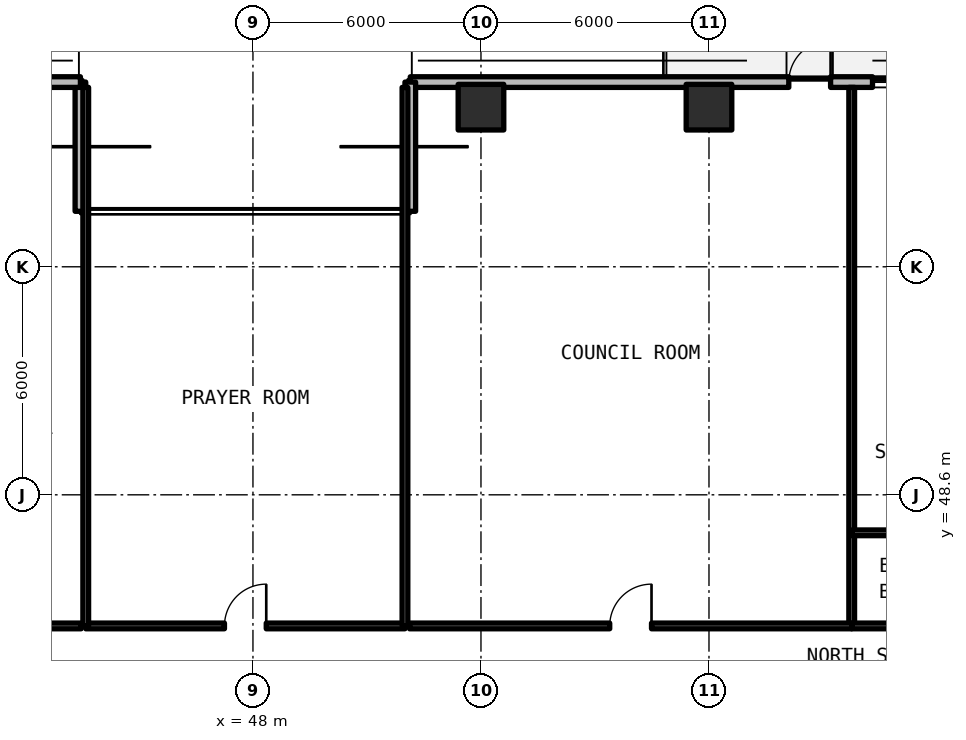
"""IFC4 building model, lengths in metres.
Left out: names, types, materials, properties, quantities, classifications, styles, units other than length and angle.
Written with IfcOpenShell. Run it as: python <this file> out.ifc"""

import sys

from ifc_helpers import new_model, si_unit, direction, frame, frame_2d, origin, origin_2d, place, context, subcontext, project, spatial, rectangle, extrude, element, fill, save


model = new_model("IFC4")
c1 = context("Model", 3, precision=1e-05, world=origin(), true_north=direction((0.0, 1.0)))
c2 = subcontext(c1, "Body", "Model", "MODEL_VIEW")
j1 = project(units=[si_unit("LENGTHUNIT", "METRE"), si_unit("PLANEANGLEUNIT", "RADIAN")], contexts=[c1])
p1 = place(None, origin())
s1 = spatial("IfcSite", under=j1, at=p1, CompositionType="ELEMENT")
p2 = place(p1, origin())
s2 = spatial("IfcBuilding", under=s1, at=p2, CompositionType="ELEMENT")
p3 = place(p2, frame((0.0, 0.0, 42.24)))
s3 = spatial("IfcBuildingStorey", under=s2, at=p3, CompositionType="ELEMENT", Elevation=42.24)
for number, where, z_axis, x_axis in (
    (1, (54.0, 58.8, 0.0), (0.0, 0.0, 1.0), (1.0, 0.0, 0.0)),
    (2, (60.0, 58.8, 0.0), (0.0, 0.0, 1.0), (1.0, 0.0, 0.0)),
):
    element("IfcColumn", number, at=place(p3, frame(where, z_axis=z_axis, x_axis=x_axis)), inside=s3, PredefinedType="COLUMN", context=c2, shape_type="SweptSolid", body=[
        extrude(rectangle(XDim=1.2, YDim=1.2, at=origin_2d()), origin(), (0.0, 0.0, 1.0), 3.3),
    ])
p4 = place(p3, frame((96.542, 59.46, 0.0), z_axis=(0.0, 0.0, 1.0), x_axis=(-1.0, 0.0, 0.0)))
e3 = element("IfcWall", 3, at=p4, inside=s3, PredefinedType="SOLIDWALL", context=c2, shape_type="SweptSolid", body=[
    extrude(rectangle(XDim=44.402, YDim=0.28, at=frame_2d((22.201, 0.0))), origin(), (0.0, 0.0, 1.0), 3.08),
])
p5 = place(p4, frame((33.342, 0.0, 0.0)))
e4 = element("IfcOpeningElement", 4, at=p5, cuts=e3, PredefinedType="OPENING", context=c2, shape_type="SweptSolid", body=[
    extrude(rectangle(XDim=1.1, YDim=2.15, at=frame_2d((0.55, 1.075))), frame((0.0, 0.15, 0.0), z_axis=(0.0, -1.0, 0.0), x_axis=(1.0, 0.0, 0.0)), (0.0, 0.0, 1.0), 0.3),
])
p6 = place(p4, frame((20.992, 0.0, 0.0)))
e5 = element("IfcOpeningElement", 5, at=p6, cuts=e3, PredefinedType="OPENING", context=c2, shape_type="SweptSolid", body=[
    extrude(rectangle(XDim=1.1, YDim=2.15, at=frame_2d((0.55, 1.075))), frame((0.0, 0.15, 0.0), z_axis=(0.0, -1.0, 0.0), x_axis=(1.0, 0.0, 0.0)), (0.0, 0.0, 1.0), 0.3),
])
p7 = place(p4, frame((9.392, 0.0, 0.0)))
e6 = element("IfcOpeningElement", 6, at=p7, cuts=e3, PredefinedType="OPENING", context=c2, shape_type="SweptSolid", body=[
    extrude(rectangle(XDim=1.1, YDim=2.15, at=frame_2d((0.55, 1.075))), frame((0.0, 0.15, 0.0), z_axis=(0.0, -1.0, 0.0), x_axis=(1.0, 0.0, 0.0)), (0.0, 0.0, 1.0), 0.3),
])
p8 = place(p4, frame((31.389, 0.0, 0.78)))
e7 = element("IfcOpeningElement", 7, at=p8, cuts=e3, PredefinedType="OPENING", context=c2, shape_type="SweptSolid", body=[
    extrude(rectangle(XDim=0.85, YDim=1.65, at=frame_2d((0.425, 0.825))), frame((0.0, 0.15, 0.0), z_axis=(0.0, -1.0, 0.0), x_axis=(1.0, 0.0, 0.0)), (0.0, 0.0, 1.0), 0.3),
])
p9 = place(p4, frame((25.408, 0.0, 0.78)))
e8 = element("IfcOpeningElement", 8, at=p9, cuts=e3, PredefinedType="OPENING", context=c2, shape_type="SweptSolid", body=[
    extrude(rectangle(XDim=2.2, YDim=1.66, at=frame_2d((1.1, 0.83))), frame((0.0, 0.15, 0.0), z_axis=(0.0, -1.0, 0.0), x_axis=(1.0, 0.0, 0.0)), (0.0, 0.0, 1.0), 0.3),
])
p10 = place(p4, frame((2.465, 0.0, 0.78)))
e9 = element("IfcOpeningElement", 9, at=p10, cuts=e3, PredefinedType="OPENING", context=c2, shape_type="SweptSolid", body=[
    extrude(rectangle(XDim=2.2, YDim=1.66, at=frame_2d((1.1, 0.83))), frame((0.0, 0.15, 0.0), z_axis=(0.0, -1.0, 0.0), x_axis=(1.0, 0.0, 0.0)), (0.0, 0.0, 1.0), 0.3),
])
for number, where, z_axis, x_axis in (
    (10, (52.14, 59.46, 0.0), (0.0, 0.0, 1.0), (0.0, -1.0, 0.0)),
    (11, (43.46, 56.06, 0.0), (0.0, 0.0, 1.0), (0.0, 1.0, 0.0)),
):
    element("IfcWall", number, at=place(p3, frame(where, z_axis=z_axis, x_axis=x_axis)), inside=s3, PredefinedType="SOLIDWALL", context=c2, shape_type="SweptSolid", body=[
        extrude(rectangle(XDim=3.4, YDim=0.28, at=frame_2d((1.7, 0.0))), origin(), (0.0, 0.0, 1.0), 3.08),
    ])
p11 = place(p3, frame((43.46, 59.46, 0.0), z_axis=(0.0, 0.0, 1.0), x_axis=(-1.0, 0.0, 0.0)))
e12 = element("IfcWall", 12, at=p11, inside=s3, PredefinedType="SOLIDWALL", context=c2, shape_type="SweptSolid", body=[
    extrude(rectangle(XDim=22.602, YDim=0.28, at=frame_2d((11.301, 0.0))), origin(), (0.0, 0.0, 1.0), 3.08),
])
p12 = place(p11, frame((15.31, 0.0, 0.0)))
e13 = element("IfcOpeningElement", 13, at=p12, cuts=e12, PredefinedType="OPENING", context=c2, shape_type="SweptSolid", body=[
    extrude(rectangle(XDim=1.1, YDim=2.15, at=frame_2d((0.55, 1.075))), frame((0.0, 0.15, 0.0), z_axis=(0.0, -1.0, 0.0), x_axis=(1.0, 0.0, 0.0)), (0.0, 0.0, 1.0), 0.3),
])
p13 = place(p11, frame((20.33, 0.0, 0.78)))
e14 = element("IfcOpeningElement", 14, at=p13, cuts=e12, PredefinedType="OPENING", context=c2, shape_type="SweptSolid", body=[
    extrude(rectangle(XDim=1.4, YDim=1.65, at=frame_2d((0.7, 0.825))), frame((0.0, 0.15, 0.0), z_axis=(0.0, -1.0, 0.0), x_axis=(1.0, 0.0, 0.0)), (0.0, 0.0, 1.0), 0.3),
])
p14 = place(p11, frame((10.436, 0.0, 0.78)))
e15 = element("IfcOpeningElement", 15, at=p14, cuts=e12, PredefinedType="OPENING", context=c2, shape_type="SweptSolid", body=[
    extrude(rectangle(XDim=2.2, YDim=1.66, at=frame_2d((1.1, 0.83))), frame((0.0, 0.15, 0.0), z_axis=(0.0, -1.0, 0.0), x_axis=(1.0, 0.0, 0.0)), (0.0, 0.0, 1.0), 0.3),
])
p15 = place(p11, frame((5.709, 0.0, 0.78)))
e16 = element("IfcOpeningElement", 16, at=p15, cuts=e12, PredefinedType="OPENING", context=c2, shape_type="SweptSolid", body=[
    extrude(rectangle(XDim=0.85, YDim=1.65, at=frame_2d((0.425, 0.825))), frame((0.0, 0.15, 0.0), z_axis=(0.0, -1.0, 0.0), x_axis=(1.0, 0.0, 0.0)), (0.0, 0.0, 1.0), 0.3),
])
p16 = place(p11, frame((3.723, 0.0, 0.78)))
e17 = element("IfcOpeningElement", 17, at=p16, cuts=e12, PredefinedType="OPENING", context=c2, shape_type="SweptSolid", body=[
    extrude(rectangle(XDim=0.85, YDim=1.65, at=frame_2d((0.425, 0.825))), frame((0.0, 0.15, 0.0), z_axis=(0.0, -1.0, 0.0), x_axis=(1.0, 0.0, 0.0)), (0.0, 0.0, 1.0), 0.3),
])
p17 = place(p11, frame((2.065, 0.0, 0.78)))
e18 = element("IfcOpeningElement", 18, at=p17, cuts=e12, PredefinedType="OPENING", context=c2, shape_type="SweptSolid", body=[
    extrude(rectangle(XDim=0.85, YDim=1.65, at=frame_2d((0.425, 0.825))), frame((0.0, 0.15, 0.0), z_axis=(0.0, -1.0, 0.0), x_axis=(1.0, 0.0, 0.0)), (0.0, 0.0, 1.0), 0.3),
])
p18 = place(p3, frame((43.6, 45.15, 0.0), z_axis=(0.0, 0.0, 1.0), x_axis=(1.0, 0.0, 0.0)))
e19 = element("IfcWall", 19, at=p18, inside=s3, PredefinedType="SOLIDWALL", context=c2, shape_type="SweptSolid", body=[
    extrude(rectangle(XDim=8.4, YDim=0.15, at=frame_2d((4.2, 0.0))), origin(), (0.0, 0.0, 1.0), 2.35),
])
p19 = place(p18, frame((3.65, 0.0, 0.0)))
e20 = element("IfcOpeningElement", 20, at=p19, cuts=e19, PredefinedType="OPENING", context=c2, shape_type="SweptSolid", body=[
    extrude(rectangle(XDim=1.1, YDim=2.15, at=frame_2d((0.55, 1.075))), frame((0.0, 0.085, 0.0), z_axis=(0.0, -1.0, 0.0), x_axis=(1.0, 0.0, 0.0)), (0.0, 0.0, 1.0), 0.17),
])
for number, where, z_axis, x_axis in (
    (21, (43.6, 45.15, 0.0), (0.0, 0.0, 1.0), (0.0, 1.0, 0.0)),
    (22, (52.0, 45.15, 0.0), (0.0, 0.0, 1.0), (0.0, 1.0, 0.0)),
):
    element("IfcWall", number, at=place(p3, frame(where, z_axis=z_axis, x_axis=x_axis)), inside=s3, PredefinedType="SOLIDWALL", context=c2, shape_type="SweptSolid", body=[
        extrude(rectangle(XDim=14.17, YDim=0.15, at=frame_2d((7.085, 0.0))), origin(), (0.0, 0.0, 1.0), 2.35),
    ])
p20 = place(p3, frame((38.524, 45.15, 0.0), z_axis=(0.0, 0.0, 1.0), x_axis=(1.0, 0.0, 0.0)))
e23 = element("IfcWall", 23, at=p20, inside=s3, PredefinedType="SOLIDWALL", context=c2, shape_type="SweptSolid", body=[
    extrude(rectangle(XDim=4.956, YDim=0.15, at=frame_2d((2.478, 0.0))), origin(), (0.0, 0.0, 1.0), 2.35),
])
p21 = place(p20, frame((2.821, 0.0, 0.0)))
e24 = element("IfcOpeningElement", 24, at=p21, cuts=e23, PredefinedType="OPENING", context=c2, shape_type="SweptSolid", body=[
    extrude(rectangle(XDim=0.95, YDim=2.15, at=frame_2d((0.475, 1.075))), frame((0.0, 0.085, 0.0), z_axis=(0.0, -1.0, 0.0), x_axis=(1.0, 0.0, 0.0)), (0.0, 0.0, 1.0), 0.17),
])
p22 = place(p3, frame((63.756, 45.15, 0.0), z_axis=(0.0, 0.0, 1.0), x_axis=(0.0, 1.0, 0.0)))
e25 = element("IfcWall", 25, at=p22, inside=s3, PredefinedType="SOLIDWALL", context=c2, shape_type="SweptSolid", body=[
    extrude(rectangle(XDim=14.17, YDim=0.15, at=frame_2d((7.085, 0.0))), origin(), (0.0, 0.0, 1.0), 2.35),
])
p23 = place(p3, frame((52.12, 45.15, 0.0), z_axis=(0.0, 0.0, 1.0), x_axis=(1.0, 0.0, 0.0)))
e26 = element("IfcWall", 26, at=p23, inside=s3, PredefinedType="SOLIDWALL", context=c2, shape_type="SweptSolid", body=[
    extrude(rectangle(XDim=11.635, YDim=0.15, at=frame_2d((5.818, 0.0))), origin(), (0.0, 0.0, 1.0), 2.35),
])
p24 = place(p23, frame((5.268, 0.0, 0.0)))
e27 = element("IfcOpeningElement", 27, at=p24, cuts=e26, PredefinedType="OPENING", context=c2, shape_type="SweptSolid", body=[
    extrude(rectangle(XDim=1.1, YDim=2.15, at=frame_2d((0.55, 1.075))), frame((0.0, 0.085, 0.0), z_axis=(0.0, -1.0, 0.0), x_axis=(1.0, 0.0, 0.0)), (0.0, 0.0, 1.0), 0.17),
])
p25 = place(p3, frame((63.756, 47.6, 0.0), z_axis=(0.0, 0.0, 1.0), x_axis=(1.0, 0.0, 0.0)))
e28 = element("IfcWall", 28, at=p25, inside=s3, PredefinedType="PARTITIONING", context=c2, shape_type="SweptSolid", body=[
    extrude(rectangle(XDim=4.164, YDim=0.15, at=frame_2d((2.082, 0.0))), origin(), (0.0, 0.0, 1.0), 2.35),
])
p26 = place(p3, frame((63.756, 45.15, 0.0), z_axis=(0.0, 0.0, 1.0), x_axis=(1.0, 0.0, 0.0)))
e29 = element("IfcWall", 29, at=p26, inside=s3, PredefinedType="SOLIDWALL", context=c2, shape_type="SweptSolid", body=[
    extrude(rectangle(XDim=9.373, YDim=0.15, at=frame_2d((4.687, 0.0))), origin(), (0.0, 0.0, 1.0), 2.35),
])
p27 = place(p26, frame((6.334, 0.0, 0.0)))
e30 = element("IfcOpeningElement", 30, at=p27, cuts=e29, PredefinedType="OPENING", context=c2, shape_type="SweptSolid", body=[
    extrude(rectangle(XDim=0.95, YDim=2.15, at=frame_2d((0.475, 1.075))), frame((0.0, 0.085, 0.0), z_axis=(0.0, -1.0, 0.0), x_axis=(1.0, 0.0, 0.0)), (0.0, 0.0, 1.0), 0.17),
])
p28 = place(p5, frame((1.1, 0.0, 0.0), z_axis=(0.0, 0.0, 1.0), x_axis=(-1.0, 0.0, 0.0)))
e31 = element("IfcDoor", 31, at=p28, inside=s3, OperationType="SINGLE_SWING_RIGHT", PredefinedType="DOOR", context=c2, shape_type="SweptSolid", body=[
    extrude(rectangle(XDim=1.1, YDim=2.15, at=frame_2d((0.55, 1.075))), frame((0.0, 0.025, 0.0), z_axis=(0.0, -1.0, 0.0), x_axis=(1.0, 0.0, 0.0)), (0.0, 0.0, 1.0), 0.05),
])
fill(e4, e31)
p29 = place(p8, origin())
e32 = element("IfcWindow", 32, at=p29, inside=s3, PartitioningType="SINGLE_PANEL", PredefinedType="WINDOW", context=c2, shape_type="SweptSolid", body=[
    extrude(rectangle(XDim=0.85, YDim=1.65, at=frame_2d((0.425, 0.825))), frame((0.0, 0.03, 0.0), z_axis=(0.0, -1.0, 0.0), x_axis=(1.0, 0.0, 0.0)), (0.0, 0.0, 1.0), 0.06),
])
fill(e7, e32)
p30 = place(p19, origin())
e33 = element("IfcDoor", 33, at=p30, inside=s3, OperationType="SINGLE_SWING_RIGHT", PredefinedType="DOOR", context=c2, shape_type="SweptSolid", body=[
    extrude(rectangle(XDim=1.1, YDim=2.15, at=frame_2d((0.55, 1.075))), frame((0.0, 0.025, 0.0), z_axis=(0.0, -1.0, 0.0), x_axis=(1.0, 0.0, 0.0)), (0.0, 0.0, 1.0), 0.05),
])
fill(e20, e33)
p31 = place(p24, origin())
e34 = element("IfcDoor", 34, at=p31, inside=s3, OperationType="SINGLE_SWING_RIGHT", PredefinedType="DOOR", context=c2, shape_type="SweptSolid", body=[
    extrude(rectangle(XDim=1.1, YDim=2.15, at=frame_2d((0.55, 1.075))), frame((0.0, 0.025, 0.0), z_axis=(0.0, -1.0, 0.0), x_axis=(1.0, 0.0, 0.0)), (0.0, 0.0, 1.0), 0.05),
])
fill(e27, e34)
save(model, sys.argv[1])
